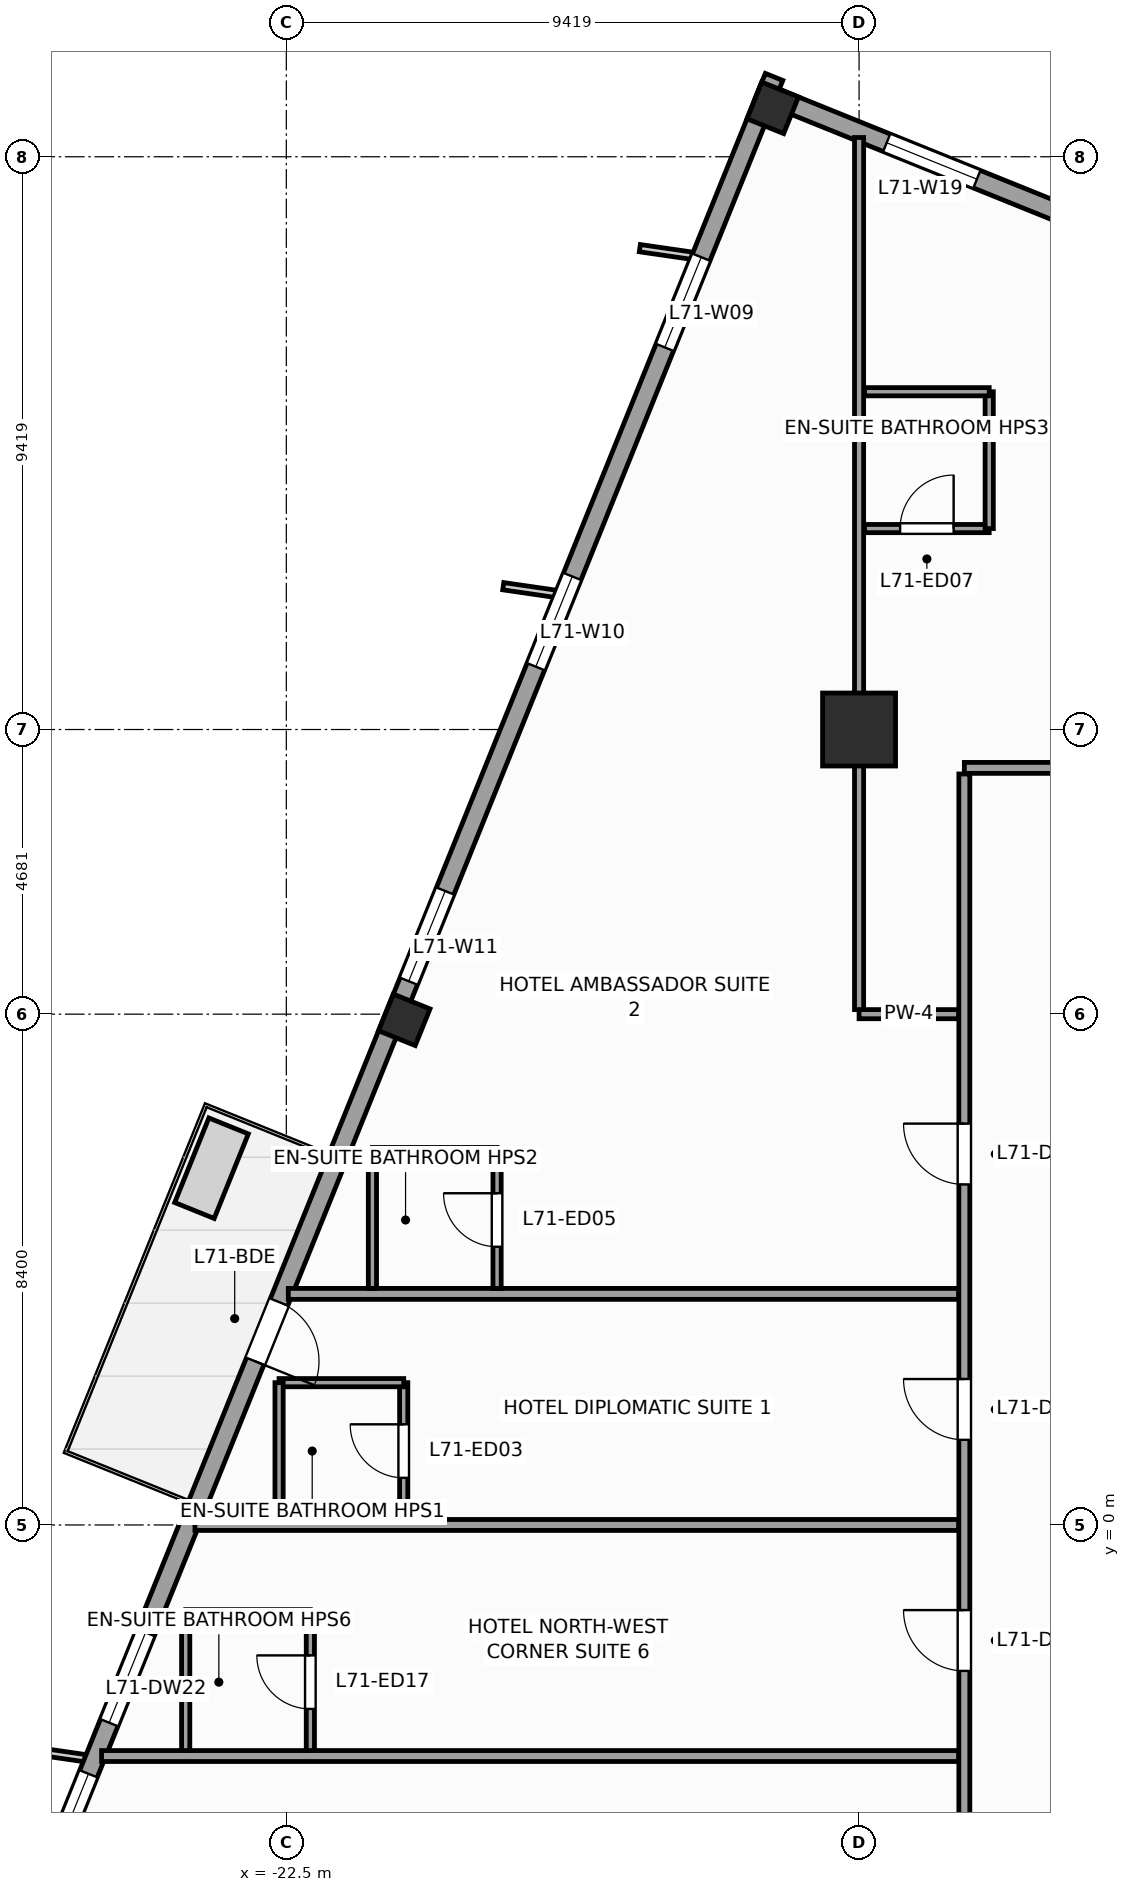
"""IFC4 building model, lengths in metres.
Left out: names, types, materials, properties, quantities, classifications, styles, units other than length and angle.
Written with IfcOpenShell. Run it as: python <this file> out.ifc"""

import sys

from ifc_helpers import new_model, si_unit, direction, frame, frame_2d, origin, origin_2d, place, context, subcontext, project, spatial, rectangle, extrude, source, transform, mapped, element, fill, save


model = new_model("IFC4")
c1 = context("Model", 3, precision=1e-05, world=origin(), true_north=direction((0.0, 1.0)))
c2 = subcontext(c1, "Body", "Model", "MODEL_VIEW")
j1 = project(units=[si_unit("LENGTHUNIT", "METRE"), si_unit("PLANEANGLEUNIT", "RADIAN")], contexts=[c1])
p1 = place(None, origin())
s1 = spatial("IfcSite", under=j1, at=p1, CompositionType="ELEMENT")
p2 = place(p1, origin())
s2 = spatial("IfcBuilding", under=s1, at=p2, CompositionType="ELEMENT")
p3 = place(p2, frame((0.0, 0.0, 290.4)))
s3 = spatial("IfcBuildingStorey", under=s2, at=p3, CompositionType="ELEMENT", Elevation=290.4)
m1 = source(origin(), c2, "Body", "SweptSolid", [
    extrude(rectangle(XDim=1.2, YDim=1.2, at=origin_2d()), origin(), (0.0, 0.0, 1.0), 3.6),
])
p4 = place(p3, frame((-13.081, 13.081, 0.0), z_axis=(0.0, 0.0, 1.0), x_axis=(1.0, 0.0, 0.0)))
e1 = element("IfcColumn", 1, at=p4, inside=s3, PredefinedType="COLUMN", context=c2, shape_type="MappedRepresentation", body=[
    mapped(m1, transform((0.0, 0.0, 0.0), scale=1.0)),
])
m2 = source(origin(), c2, "Body", "SweptSolid", [
    extrude(rectangle(XDim=0.65, YDim=0.65, at=origin_2d()), origin(), (0.0, 0.0, 1.0), 3.6),
])
for number, where, z_axis, x_axis in (
    (2, (-14.501, 23.304, 0.0), (0.0, 0.0, 1.0), (0.375, 0.927, 0.0)),
    (3, (-20.56, 8.307, 0.0), (0.0, 0.0, 1.0), (0.375, 0.927, 0.0)),
):
    element("IfcColumn", number, at=place(p3, frame(where, z_axis=z_axis, x_axis=x_axis)), inside=s3, PredefinedType="COLUMN", context=c2, shape_type="MappedRepresentation", body=[
        mapped(m2, transform((0.0, 0.0, 0.0), scale=1.0)),
    ])
p5 = place(p3, frame((-9.032, 21.278, 0.0), z_axis=(0.0, 0.0, 1.0), x_axis=(-0.927185411764, 0.374602739196, 0.0)))
e4 = element("IfcWall", 4, at=p5, inside=s3, PredefinedType="STANDARD", context=c2, shape_type="SweptSolid", body=[
    extrude(rectangle(XDim=6.155, YDim=0.31, at=frame_2d((3.078, 0.0))), origin(), (0.0, 0.0, 1.0), 3.35),
])
p6 = place(p5, frame((2.278, 0.0, 0.47)))
e5 = element("IfcOpeningElement", 5, at=p6, cuts=e4, PredefinedType="OPENING", context=c2, shape_type="SweptSolid", body=[
    extrude(rectangle(XDim=1.6, YDim=2.1, at=frame_2d((0.8, 1.05))), frame((0.0, 0.165, 0.0), z_axis=(0.0, -1.0, 0.0), x_axis=(1.0, 0.0, 0.0)), (0.0, 0.0, 1.0), 0.33),
])
p7 = place(p3, frame((-14.479, 23.813, 0.0), z_axis=(0.0, 0.0, 1.0), x_axis=(-0.374609557019, -0.927182657188, 0.0)))
e6 = element("IfcWall", 6, at=p7, inside=s3, PredefinedType="STANDARD", context=c2, shape_type="SweptSolid", body=[
    extrude(rectangle(XDim=33.31, YDim=0.31, at=frame_2d((16.655, 0.0))), origin(), (0.0, 0.0, 1.0), 2.75),
])
p8 = place(p7, frame((21.73, 0.0, 0.0)))
e7 = element("IfcOpeningElement", 7, at=p8, cuts=e6, PredefinedType="OPENING", context=c2, shape_type="SweptSolid", body=[
    extrude(rectangle(XDim=1.05, YDim=2.25, at=frame_2d((0.525, 1.125))), frame((0.0, 0.165, 0.0), z_axis=(0.0, -1.0, 0.0), x_axis=(1.0, 0.0, 0.0)), (0.0, 0.0, 1.0), 0.33),
])
p9 = place(p7, frame((3.197, 0.0, 0.47)))
e8 = element("IfcOpeningElement", 8, at=p9, cuts=e6, PredefinedType="OPENING", context=c2, shape_type="SweptSolid", body=[
    extrude(rectangle(XDim=1.6, YDim=2.1, at=frame_2d((0.8, 1.05))), frame((0.0, 0.165, 0.0), z_axis=(0.0, -1.0, 0.0), x_axis=(1.0, 0.0, 0.0)), (0.0, 0.0, 1.0), 0.33),
])
p10 = place(p7, frame((8.86, 0.0, 0.47)))
e9 = element("IfcOpeningElement", 9, at=p10, cuts=e6, PredefinedType="OPENING", context=c2, shape_type="SweptSolid", body=[
    extrude(rectangle(XDim=1.6, YDim=2.1, at=frame_2d((0.8, 1.05))), frame((0.0, 0.165, 0.0), z_axis=(0.0, -1.0, 0.0), x_axis=(1.0, 0.0, 0.0)), (0.0, 0.0, 1.0), 0.33),
])
p11 = place(p7, frame((14.439, 0.0, 0.47)))
e10 = element("IfcOpeningElement", 10, at=p11, cuts=e6, PredefinedType="OPENING", context=c2, shape_type="SweptSolid", body=[
    extrude(rectangle(XDim=1.6, YDim=2.1, at=frame_2d((0.8, 1.05))), frame((0.0, 0.165, 0.0), z_axis=(0.0, -1.0, 0.0), x_axis=(1.0, 0.0, 0.0)), (0.0, 0.0, 1.0), 0.33),
])
p12 = place(p7, frame((30.097, 0.0, 0.47)))
e11 = element("IfcOpeningElement", 11, at=p12, cuts=e6, PredefinedType="OPENING", context=c2, shape_type="SweptSolid", body=[
    extrude(rectangle(XDim=1.6, YDim=2.1, at=frame_2d((0.8, 1.05))), frame((0.0, 0.165, 0.0), z_axis=(0.0, -1.0, 0.0), x_axis=(1.0, 0.0, 0.0)), (0.0, 0.0, 1.0), 0.33),
])
p13 = place(p7, frame((27.59, 0.0, 0.47)))
e12 = element("IfcOpeningElement", 12, at=p13, cuts=e6, PredefinedType="OPENING", context=c2, shape_type="SweptSolid", body=[
    extrude(rectangle(XDim=1.6, YDim=2.1, at=frame_2d((0.8, 1.05))), frame((0.0, 0.165, 0.0), z_axis=(0.0, -1.0, 0.0), x_axis=(1.0, 0.0, 0.0)), (0.0, 0.0, 1.0), 0.33),
])
p14 = place(p3, frame((-11.35, 12.45, 0.0), z_axis=(0.0, 0.0, 1.0), x_axis=(1.0, 0.0, 0.0)))
e13 = element("IfcWall", 13, at=p14, inside=s3, PredefinedType="PARTITIONING", context=c2, shape_type="SweptSolid", body=[
    extrude(rectangle(XDim=22.8, YDim=0.18, at=frame_2d((11.4, 0.0))), origin(), (0.0, 0.0, 1.0), 3.35),
])
p15 = place(p14, frame((6.089, 0.0, 0.0)))
e14 = element("IfcOpeningElement", 14, at=p15, cuts=e13, PredefinedType="OPENING", context=c2, shape_type="SweptSolid", body=[
    extrude(rectangle(XDim=1.0, YDim=2.15, at=frame_2d((0.5, 1.075))), frame((0.0, 0.1, 0.0), z_axis=(0.0, -1.0, 0.0), x_axis=(1.0, 0.0, 0.0)), (0.0, 0.0, 1.0), 0.2),
])
p16 = place(p14, frame((17.161, 0.0, 0.0)))
e15 = element("IfcOpeningElement", 15, at=p16, cuts=e13, PredefinedType="OPENING", context=c2, shape_type="SweptSolid", body=[
    extrude(rectangle(XDim=1.0, YDim=2.15, at=frame_2d((0.5, 1.075))), frame((0.0, 0.1, 0.0), z_axis=(0.0, -1.0, 0.0), x_axis=(1.0, 0.0, 0.0)), (0.0, 0.0, 1.0), 0.2),
])
p17 = place(p3, frame((-11.35, -10.2, 0.0), z_axis=(0.0, 0.0, 1.0), x_axis=(0.0, 1.0, 0.0)))
e16 = element("IfcWall", 16, at=p17, inside=s3, PredefinedType="PARTITIONING", context=c2, shape_type="SweptSolid", body=[
    extrude(rectangle(XDim=22.55, YDim=0.18, at=frame_2d((11.275, 0.0))), origin(), (0.0, 0.0, 1.0), 3.35),
])
p18 = place(p17, frame((11.6, 0.0, 0.0)))
e17 = element("IfcOpeningElement", 17, at=p18, cuts=e16, PredefinedType="OPENING", context=c2, shape_type="SweptSolid", body=[
    extrude(rectangle(XDim=1.0, YDim=2.15, at=frame_2d((0.5, 1.075))), frame((0.0, 0.1, 0.0), z_axis=(0.0, -1.0, 0.0), x_axis=(1.0, 0.0, 0.0)), (0.0, 0.0, 1.0), 0.2),
])
p19 = place(p17, frame((15.8, 0.0, 0.0)))
e18 = element("IfcOpeningElement", 18, at=p19, cuts=e16, PredefinedType="OPENING", context=c2, shape_type="SweptSolid", body=[
    extrude(rectangle(XDim=1.0, YDim=2.15, at=frame_2d((0.5, 1.075))), frame((0.0, 0.1, 0.0), z_axis=(0.0, -1.0, 0.0), x_axis=(1.0, 0.0, 0.0)), (0.0, 0.0, 1.0), 0.2),
])
p20 = place(p17, frame((3.6, 0.0, 0.0)))
e19 = element("IfcOpeningElement", 19, at=p20, cuts=e16, PredefinedType="OPENING", context=c2, shape_type="SweptSolid", body=[
    extrude(rectangle(XDim=1.0, YDim=2.15, at=frame_2d((0.5, 1.075))), frame((0.0, 0.1, 0.0), z_axis=(0.0, -1.0, 0.0), x_axis=(1.0, 0.0, 0.0)), (0.0, 0.0, 1.0), 0.2),
])
p21 = place(p17, frame((7.8, 0.0, 0.0)))
e20 = element("IfcOpeningElement", 20, at=p21, cuts=e16, PredefinedType="OPENING", context=c2, shape_type="SweptSolid", body=[
    extrude(rectangle(XDim=1.0, YDim=2.15, at=frame_2d((0.5, 1.075))), frame((0.0, 0.1, 0.0), z_axis=(0.0, -1.0, 0.0), x_axis=(1.0, 0.0, 0.0)), (0.0, 0.0, 1.0), 0.2),
])
p22 = place(p3, frame((-11.445, -3.8, 0.0), z_axis=(0.0, 0.0, 1.0), x_axis=(-1.0, 0.0, 0.0)))
e21 = element("IfcWall", 21, at=p22, inside=s3, PredefinedType="PARTITIONING", context=c2, shape_type="SweptSolid", body=[
    extrude(rectangle(XDim=14.093, YDim=0.18, at=frame_2d((7.046, 0.0))), origin(), (0.0, 0.0, 1.0), 3.35),
])
p23 = place(p3, frame((-11.445, 0.0, 0.0), z_axis=(0.0, 0.0, 1.0), x_axis=(-1.0, 0.0, 0.0)))
e22 = element("IfcWall", 22, at=p23, inside=s3, PredefinedType="PARTITIONING", context=c2, shape_type="SweptSolid", body=[
    extrude(rectangle(XDim=12.558, YDim=0.18, at=frame_2d((6.279, 0.0))), origin(), (0.0, 0.0, 1.0), 3.35),
])
p24 = place(p3, frame((-11.445, 3.8, 0.0), z_axis=(0.0, 0.0, 1.0), x_axis=(-1.0, 0.0, 0.0)))
e23 = element("IfcWall", 23, at=p24, inside=s3, PredefinedType="PARTITIONING", context=c2, shape_type="SweptSolid", body=[
    extrude(rectangle(XDim=11.022, YDim=0.18, at=frame_2d((5.511, 0.0))), origin(), (0.0, 0.0, 1.0), 3.35),
])
p25 = place(p3, frame((-11.445, 8.4, 0.0), z_axis=(0.0, 0.0, 1.0), x_axis=(-1.0, 0.0, 0.0)))
e24 = element("IfcWall", 24, at=p25, inside=s3, PredefinedType="PARTITIONING", context=c2, shape_type="SweptSolid", body=[
    extrude(rectangle(XDim=1.636, YDim=0.15, at=frame_2d((0.818, 0.0))), origin(), (0.0, 0.0, 1.0), 3.35),
])
p26 = place(p3, frame((-13.081, 8.475, 0.0), z_axis=(0.0, 0.0, 1.0), x_axis=(0.0, 1.0, 0.0)))
e25 = element("IfcWall", 25, at=p26, inside=s3, PredefinedType="PARTITIONING", context=c2, shape_type="SweptSolid", body=[
    extrude(rectangle(XDim=14.342, YDim=0.15, at=frame_2d((7.171, 0.0))), origin(), (0.0, 0.0, 1.0), 2.45),
])
p27 = place(p3, frame((-20.57, 0.09, 0.0), z_axis=(0.0, 0.0, 1.0), x_axis=(0.0, 1.0, 0.0)))
e26 = element("IfcWall", 26, at=p27, inside=s3, PredefinedType="PARTITIONING", context=c2, shape_type="SweptSolid", body=[
    extrude(rectangle(XDim=2.25, YDim=0.135, at=frame_2d((1.125, 0.0))), origin(), (0.0, 0.0, 1.0), 3.35),
])
p28 = place(p27, frame((0.685, 0.0, 0.0)))
e27 = element("IfcOpeningElement", 27, at=p28, cuts=e26, PredefinedType="OPENING", context=c2, shape_type="SweptSolid", body=[
    extrude(rectangle(XDim=0.88, YDim=2.1, at=frame_2d((0.44, 1.05))), frame((0.0, 0.078, 0.0), z_axis=(0.0, -1.0, 0.0), x_axis=(1.0, 0.0, 0.0)), (0.0, 0.0, 1.0), 0.155),
])
p29 = place(p3, frame((-22.619, 2.34, 0.0), z_axis=(0.0, 0.0, 1.0), x_axis=(1.0, 0.0, 0.0)))
e28 = element("IfcWall", 28, at=p29, inside=s3, PredefinedType="PARTITIONING", context=c2, shape_type="SweptSolid", body=[
    extrude(rectangle(XDim=2.05, YDim=0.135, at=frame_2d((1.025, 0.0))), origin(), (0.0, 0.0, 1.0), 3.35),
])
p30 = place(p3, frame((-22.619, 0.09, 0.0), z_axis=(0.0, 0.0, 1.0), x_axis=(0.0, 1.0, 0.0)))
e29 = element("IfcWall", 29, at=p30, inside=s3, PredefinedType="PARTITIONING", context=c2, shape_type="SweptSolid", body=[
    extrude(rectangle(XDim=2.25, YDim=0.135, at=frame_2d((1.125, 0.0))), origin(), (0.0, 0.0, 1.0), 3.35),
])
p31 = place(p3, frame((-19.034, 3.89, 0.0), z_axis=(0.0, 0.0, 1.0), x_axis=(0.0, 1.0, 0.0)))
e30 = element("IfcWall", 30, at=p31, inside=s3, PredefinedType="PARTITIONING", context=c2, shape_type="SweptSolid", body=[
    extrude(rectangle(XDim=2.25, YDim=0.135, at=frame_2d((1.125, 0.0))), origin(), (0.0, 0.0, 1.0), 3.35),
])
p32 = place(p31, frame((0.685, 0.0, 0.0)))
e31 = element("IfcOpeningElement", 31, at=p32, cuts=e30, PredefinedType="OPENING", context=c2, shape_type="SweptSolid", body=[
    extrude(rectangle(XDim=0.88, YDim=2.1, at=frame_2d((0.44, 1.05))), frame((0.0, 0.078, 0.0), z_axis=(0.0, -1.0, 0.0), x_axis=(1.0, 0.0, 0.0)), (0.0, 0.0, 1.0), 0.155),
])
p33 = place(p3, frame((-21.084, 6.14, 0.0), z_axis=(0.0, 0.0, 1.0), x_axis=(1.0, 0.0, 0.0)))
e32 = element("IfcWall", 32, at=p33, inside=s3, PredefinedType="PARTITIONING", context=c2, shape_type="SweptSolid", body=[
    extrude(rectangle(XDim=2.05, YDim=0.135, at=frame_2d((1.025, 0.0))), origin(), (0.0, 0.0, 1.0), 3.35),
])
p34 = place(p3, frame((-21.084, 3.89, 0.0), z_axis=(0.0, 0.0, 1.0), x_axis=(0.0, 1.0, 0.0)))
e33 = element("IfcWall", 33, at=p34, inside=s3, PredefinedType="PARTITIONING", context=c2, shape_type="SweptSolid", body=[
    extrude(rectangle(XDim=2.25, YDim=0.135, at=frame_2d((1.125, 0.0))), origin(), (0.0, 0.0, 1.0), 3.35),
])
p35 = place(p3, frame((-12.991, 16.386, 0.0), z_axis=(0.0, 0.0, 1.0), x_axis=(1.0, 0.0, 0.0)))
e34 = element("IfcWall", 34, at=p35, inside=s3, PredefinedType="PARTITIONING", context=c2, shape_type="SweptSolid", body=[
    extrude(rectangle(XDim=2.05, YDim=0.135, at=frame_2d((1.025, 0.0))), origin(), (0.0, 0.0, 1.0), 3.35),
])
p36 = place(p35, frame((0.585, 0.0, 0.0)))
e35 = element("IfcOpeningElement", 35, at=p36, cuts=e34, PredefinedType="OPENING", context=c2, shape_type="SweptSolid", body=[
    extrude(rectangle(XDim=0.88, YDim=2.1, at=frame_2d((0.44, 1.05))), frame((0.0, 0.078, 0.0), z_axis=(0.0, -1.0, 0.0), x_axis=(1.0, 0.0, 0.0)), (0.0, 0.0, 1.0), 0.155),
])
p37 = place(p3, frame((-10.941, 16.386, 0.0), z_axis=(0.0, 0.0, 1.0), x_axis=(0.0, 1.0, 0.0)))
e36 = element("IfcWall", 36, at=p37, inside=s3, PredefinedType="PARTITIONING", context=c2, shape_type="SweptSolid", body=[
    extrude(rectangle(XDim=2.25, YDim=0.135, at=frame_2d((1.125, 0.0))), origin(), (0.0, 0.0, 1.0), 3.35),
])
p38 = place(p3, frame((-12.991, 18.636, 0.0), z_axis=(0.0, 0.0, 1.0), x_axis=(1.0, 0.0, 0.0)))
e37 = element("IfcWall", 37, at=p38, inside=s3, PredefinedType="PARTITIONING", context=c2, shape_type="SweptSolid", body=[
    extrude(rectangle(XDim=2.05, YDim=0.135, at=frame_2d((1.025, 0.0))), origin(), (0.0, 0.0, 1.0), 3.35),
])
p39 = place(p3, frame((-22.105, -3.71, 0.0), z_axis=(0.0, 0.0, 1.0), x_axis=(0.0, 1.0, 0.0)))
e38 = element("IfcWall", 38, at=p39, inside=s3, PredefinedType="PARTITIONING", context=c2, shape_type="SweptSolid", body=[
    extrude(rectangle(XDim=2.25, YDim=0.135, at=frame_2d((1.125, 0.0))), origin(), (0.0, 0.0, 1.0), 3.35),
])
p40 = place(p39, frame((0.685, 0.0, 0.0)))
e39 = element("IfcOpeningElement", 39, at=p40, cuts=e38, PredefinedType="OPENING", context=c2, shape_type="SweptSolid", body=[
    extrude(rectangle(XDim=0.88, YDim=2.1, at=frame_2d((0.44, 1.05))), frame((0.0, 0.078, 0.0), z_axis=(0.0, -1.0, 0.0), x_axis=(1.0, 0.0, 0.0)), (0.0, 0.0, 1.0), 0.155),
])
p41 = place(p3, frame((-24.155, -1.46, 0.0), z_axis=(0.0, 0.0, 1.0), x_axis=(1.0, 0.0, 0.0)))
e40 = element("IfcWall", 40, at=p41, inside=s3, PredefinedType="PARTITIONING", context=c2, shape_type="SweptSolid", body=[
    extrude(rectangle(XDim=2.05, YDim=0.135, at=frame_2d((1.025, 0.0))), origin(), (0.0, 0.0, 1.0), 3.35),
])
p42 = place(p3, frame((-24.155, -3.71, 0.0), z_axis=(0.0, 0.0, 1.0), x_axis=(0.0, 1.0, 0.0)))
e41 = element("IfcWall", 41, at=p42, inside=s3, PredefinedType="PARTITIONING", context=c2, shape_type="SweptSolid", body=[
    extrude(rectangle(XDim=2.25, YDim=0.135, at=frame_2d((1.125, 0.0))), origin(), (0.0, 0.0, 1.0), 3.35),
])
m3 = source(origin(), c2, "Body", "SweptSolid", [
    extrude(rectangle(XDim=1.05, YDim=2.25, at=frame_2d((0.525, 1.125))), frame((0.0, 0.025, 0.0), z_axis=(0.0, -1.0, 0.0), x_axis=(1.0, 0.0, 0.0)), (0.0, 0.0, 1.0), 0.05),
])
p43 = place(p8, origin())
e42 = element("IfcDoor", 42, at=p43, inside=s3, OperationType="SINGLE_SWING_RIGHT", PredefinedType="DOOR", context=c2, shape_type="MappedRepresentation", body=[
    mapped(m3, transform((0.0, 0.0, 0.0), scale=1.0)),
])
fill(e7, e42)
m4 = source(origin(), c2, "Body", "SweptSolid", [
    extrude(rectangle(XDim=1.6, YDim=2.1, at=frame_2d((0.8, 1.05))), frame((0.0, 0.03, 0.0), z_axis=(0.0, -1.0, 0.0), x_axis=(1.0, 0.0, 0.0)), (0.0, 0.0, 1.0), 0.06),
])
p44 = place(p9, origin())
e43 = element("IfcWindow", 43, at=p44, inside=s3, PartitioningType="SINGLE_PANEL", PredefinedType="WINDOW", context=c2, shape_type="MappedRepresentation", body=[
    mapped(m4, transform((0.0, 0.0, 0.0), scale=1.0)),
])
fill(e8, e43)
p45 = place(p10, origin())
e44 = element("IfcWindow", 44, at=p45, inside=s3, PartitioningType="SINGLE_PANEL", PredefinedType="WINDOW", context=c2, shape_type="MappedRepresentation", body=[
    mapped(m4, transform((0.0, 0.0, 0.0), scale=1.0)),
])
fill(e9, e44)
p46 = place(p11, origin())
e45 = element("IfcWindow", 45, at=p46, inside=s3, PartitioningType="SINGLE_PANEL", PredefinedType="WINDOW", context=c2, shape_type="MappedRepresentation", body=[
    mapped(m4, transform((0.0, 0.0, 0.0), scale=1.0)),
])
fill(e10, e45)
p47 = place(p12, origin())
e46 = element("IfcWindow", 46, at=p47, inside=s3, PartitioningType="SINGLE_PANEL", PredefinedType="WINDOW", context=c2, shape_type="MappedRepresentation", body=[
    mapped(m4, transform((0.0, 0.0, 0.0), scale=1.0)),
])
fill(e11, e46)
p48 = place(p6, origin())
e47 = element("IfcWindow", 47, at=p48, inside=s3, PartitioningType="SINGLE_PANEL", PredefinedType="WINDOW", context=c2, shape_type="MappedRepresentation", body=[
    mapped(m4, transform((0.0, 0.0, 0.0), scale=1.0)),
])
fill(e5, e47)
m5 = source(origin(), c2, "Body", "SweptSolid", [
    extrude(rectangle(XDim=1.0, YDim=2.15, at=frame_2d((0.5, 1.075))), frame((0.0, 0.025, 0.0), z_axis=(0.0, -1.0, 0.0), x_axis=(1.0, 0.0, 0.0)), (0.0, 0.0, 1.0), 0.05),
])
p49 = place(p18, origin())
e48 = element("IfcDoor", 48, at=p49, inside=s3, OperationType="SINGLE_SWING_RIGHT", PredefinedType="DOOR", context=c2, shape_type="MappedRepresentation", body=[
    mapped(m5, transform((0.0, 0.0, 0.0), scale=1.0)),
])
fill(e17, e48)
m6 = source(origin(), c2, "Body", "SweptSolid", [
    extrude(rectangle(XDim=0.88, YDim=2.1, at=frame_2d((0.44, 1.05))), frame((0.0, 0.025, 0.0), z_axis=(0.0, -1.0, 0.0), x_axis=(1.0, 0.0, 0.0)), (0.0, 0.0, 1.0), 0.05),
])
p50 = place(p28, origin())
e49 = element("IfcDoor", 49, at=p50, inside=s3, OperationType="SINGLE_SWING_RIGHT", PredefinedType="DOOR", context=c2, shape_type="MappedRepresentation", body=[
    mapped(m6, transform((0.0, 0.0, 0.0), scale=1.0)),
])
fill(e27, e49)
p51 = place(p19, origin())
e50 = element("IfcDoor", 50, at=p51, inside=s3, OperationType="SINGLE_SWING_RIGHT", PredefinedType="DOOR", context=c2, shape_type="MappedRepresentation", body=[
    mapped(m5, transform((0.0, 0.0, 0.0), scale=1.0)),
])
fill(e18, e50)
p52 = place(p32, origin())
e51 = element("IfcDoor", 51, at=p52, inside=s3, OperationType="SINGLE_SWING_RIGHT", PredefinedType="DOOR", context=c2, shape_type="MappedRepresentation", body=[
    mapped(m6, transform((0.0, 0.0, 0.0), scale=1.0)),
])
fill(e31, e51)
p53 = place(p36, origin())
e52 = element("IfcDoor", 52, at=p53, inside=s3, OperationType="SINGLE_SWING_RIGHT", PredefinedType="DOOR", context=c2, shape_type="MappedRepresentation", body=[
    mapped(m6, transform((0.0, 0.0, 0.0), scale=1.0)),
])
fill(e35, e52)
p54 = place(p21, origin())
e53 = element("IfcDoor", 53, at=p54, inside=s3, OperationType="SINGLE_SWING_RIGHT", PredefinedType="DOOR", context=c2, shape_type="MappedRepresentation", body=[
    mapped(m5, transform((0.0, 0.0, 0.0), scale=1.0)),
])
fill(e20, e53)
p55 = place(p40, origin())
e54 = element("IfcDoor", 54, at=p55, inside=s3, OperationType="SINGLE_SWING_RIGHT", PredefinedType="DOOR", context=c2, shape_type="MappedRepresentation", body=[
    mapped(m6, transform((0.0, 0.0, 0.0), scale=1.0)),
])
fill(e39, e54)
p56 = place(p13, origin())
e55 = element("IfcWindow", 55, at=p56, inside=s3, PartitioningType="SINGLE_PANEL", PredefinedType="WINDOW", context=c2, shape_type="MappedRepresentation", body=[
    mapped(m4, transform((0.0, 0.0, 0.0), scale=1.0)),
])
fill(e12, e55)
save(model, sys.argv[1])
